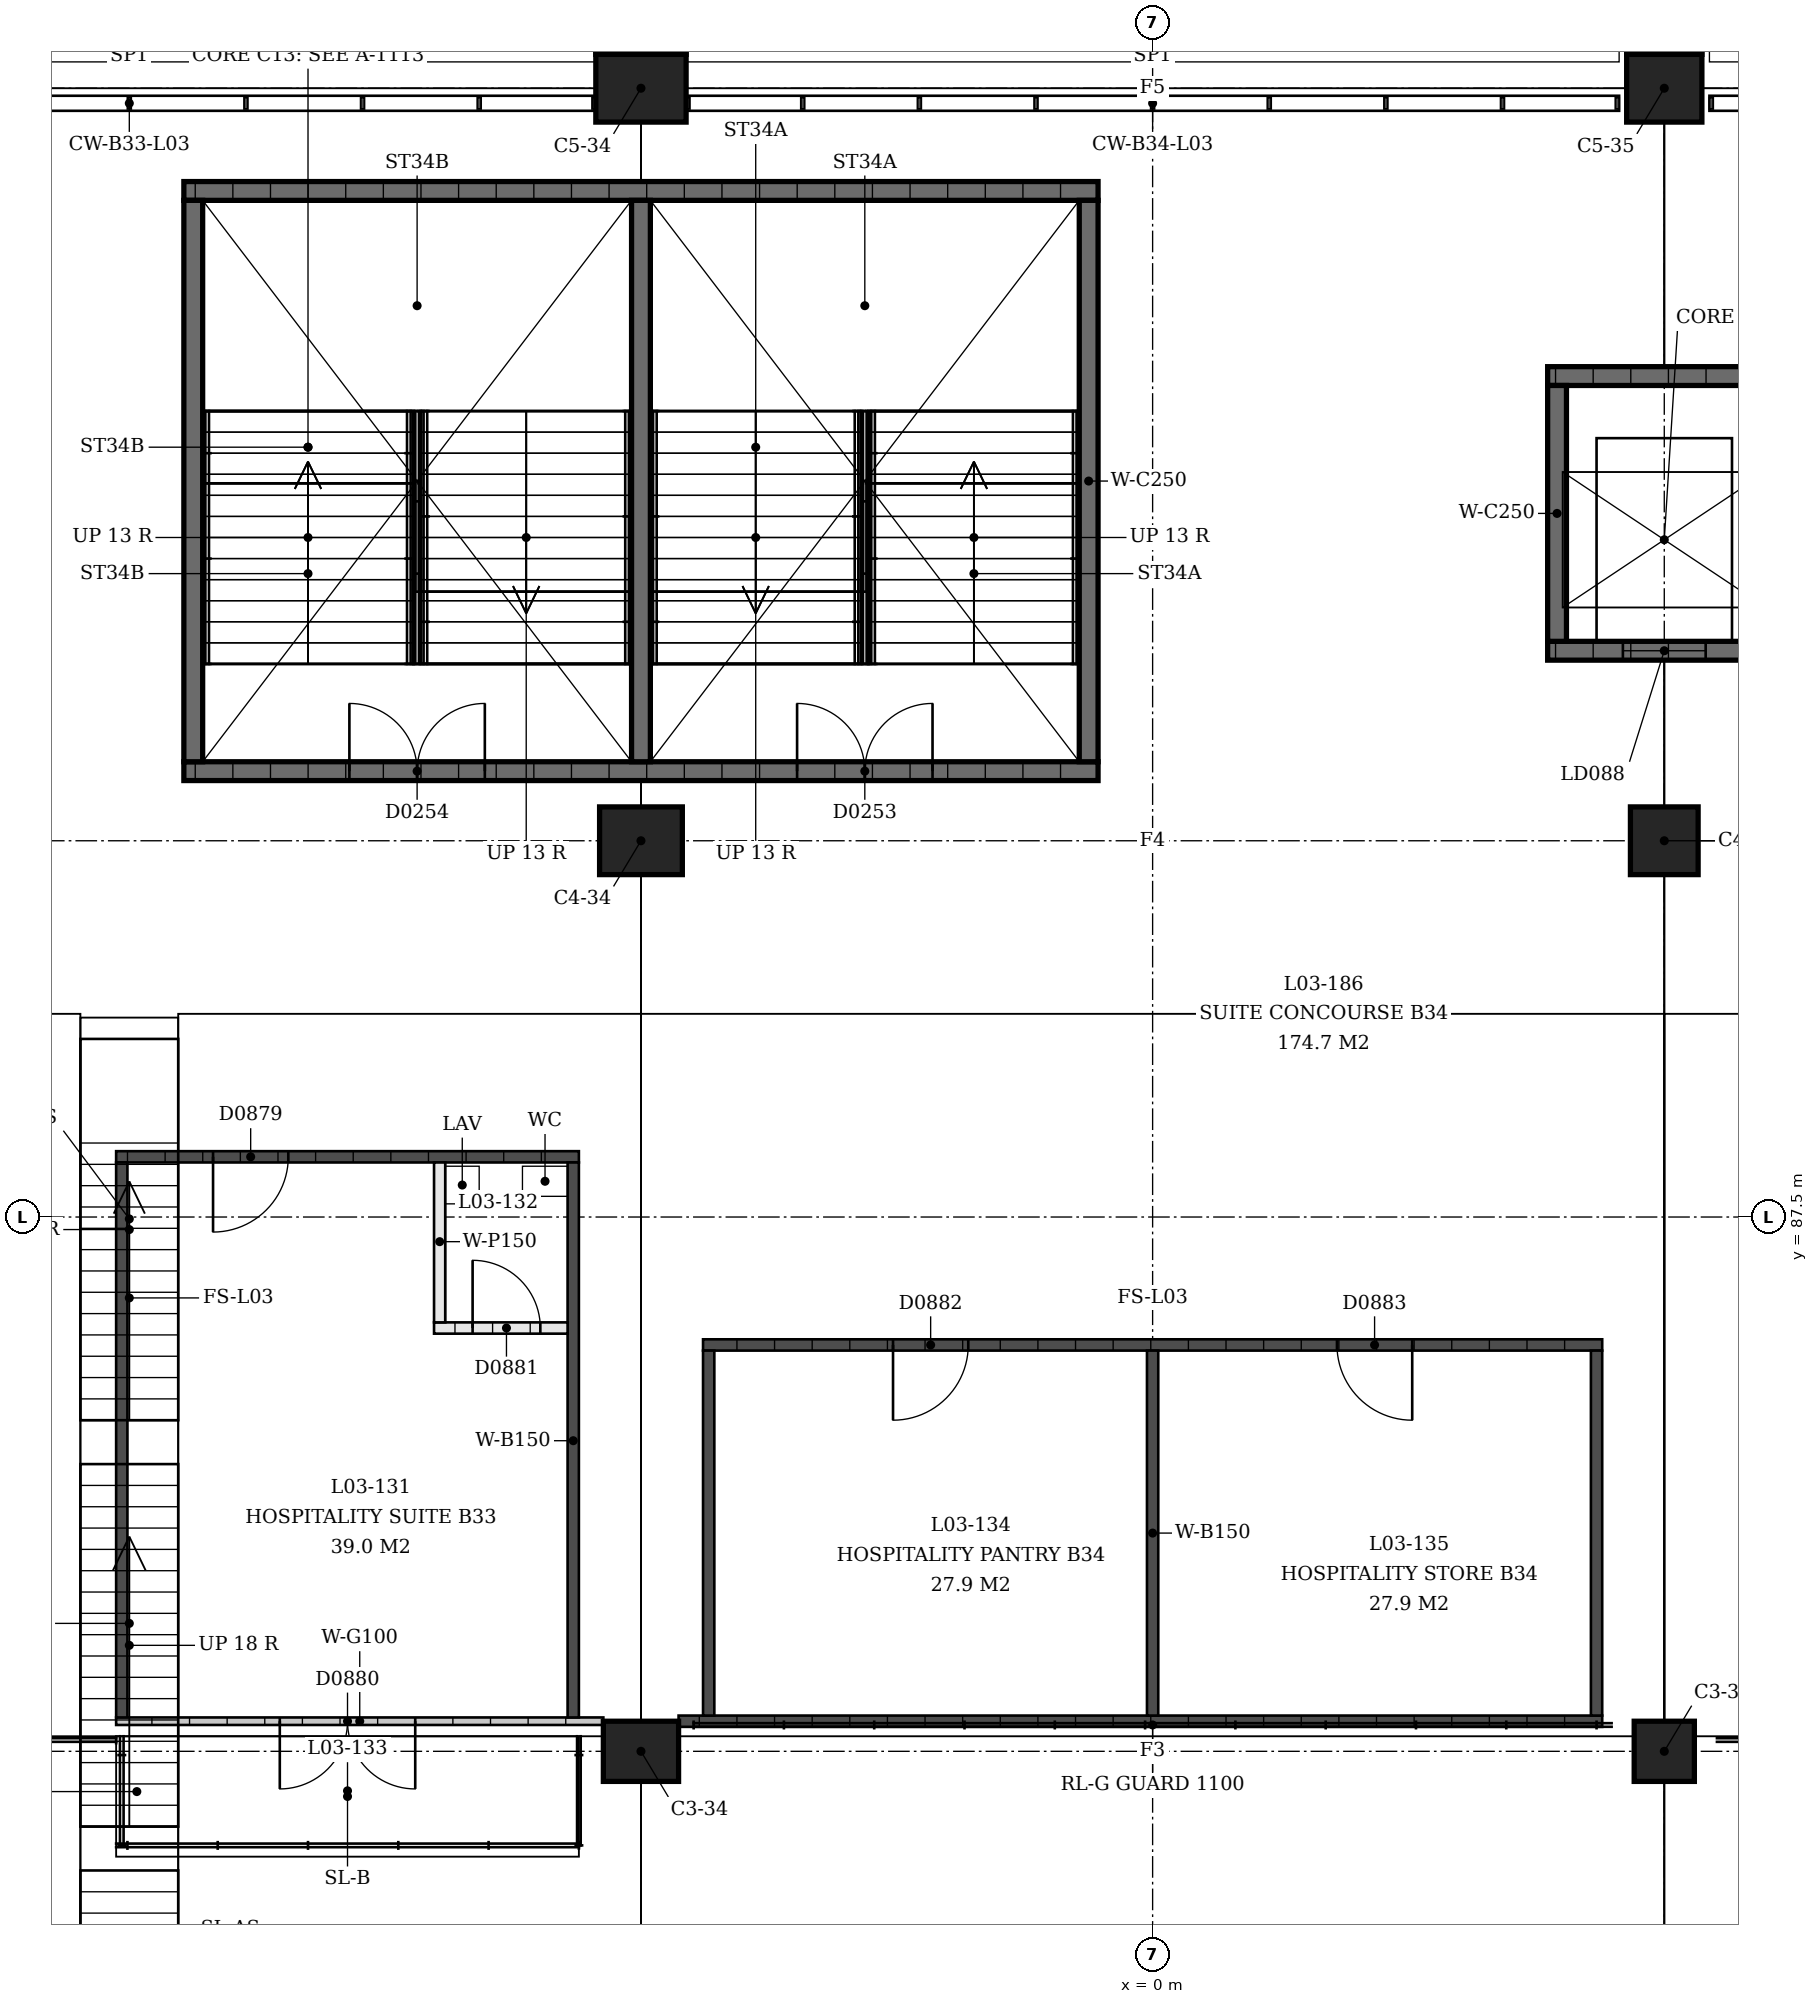
"""IFC4 building model, lengths in metres.
Left out: names, types, materials, properties, quantities, classifications, styles, units other than length and angle.
Written with IfcOpenShell. Run it as: python <this file> out.ifc"""

import sys

from ifc_helpers import new_model, si_unit, direction, frame, frame_2d, origin, origin_2d, place, context, subcontext, project, spatial, rectangle, extrude, element, fill, save


model = new_model("IFC4")
c1 = context("Model", 3, precision=1e-05, world=origin(), true_north=direction((0.0, 1.0)))
c2 = subcontext(c1, "Body", "Model", "MODEL_VIEW")
j1 = project(units=[si_unit("LENGTHUNIT", "METRE"), si_unit("PLANEANGLEUNIT", "RADIAN")], contexts=[c1])
p1 = place(None, origin())
s1 = spatial("IfcSite", under=j1, at=p1, CompositionType="ELEMENT")
p2 = place(p1, origin())
s2 = spatial("IfcBuilding", under=s1, at=p2, CompositionType="ELEMENT")
p3 = place(p2, frame((0.0, 0.0, 13.5)))
s3 = spatial("IfcBuildingStorey", under=s2, at=p3, CompositionType="ELEMENT", Elevation=13.5)
p4 = place(p3, frame((-6.8, 80.4, 0.0), z_axis=(0.0, 0.0, 1.0), x_axis=(-1.0, 0.0, 0.0)))
e1 = element("IfcColumn", 1, at=p4, inside=s3, PredefinedType="COLUMN", context=c2, shape_type="SweptSolid", body=[
    extrude(rectangle(XDim=1.0, YDim=0.8, at=origin_2d()), origin(), (0.0, 0.0, 1.0), 2.033),
])
p5 = place(p3, frame((-6.8, 92.5, 0.0), z_axis=(0.0, 0.0, 1.0), x_axis=(-1.0, 0.0, 0.0)))
e2 = element("IfcColumn", 2, at=p5, inside=s3, PredefinedType="COLUMN", context=c2, shape_type="SweptSolid", body=[
    extrude(rectangle(XDim=1.1, YDim=0.9, at=origin_2d()), origin(), (0.0, 0.0, 1.0), 4.5),
])
p6 = place(p3, frame((-6.8, 102.5, 0.0), z_axis=(0.0, 0.0, 1.0), x_axis=(-1.0, 0.0, 0.0)))
e3 = element("IfcColumn", 3, at=p6, inside=s3, PredefinedType="COLUMN", context=c2, shape_type="SweptSolid", body=[
    extrude(rectangle(XDim=1.2, YDim=0.9, at=origin_2d()), origin(), (0.0, 0.0, 1.0), 4.5),
])
p7 = place(p3, frame((6.8, 80.4, 0.0), z_axis=(0.0, 0.0, 1.0), x_axis=(-1.0, 0.0, 0.0)))
e4 = element("IfcColumn", 4, at=p7, inside=s3, PredefinedType="COLUMN", context=c2, shape_type="SweptSolid", body=[
    extrude(rectangle(XDim=0.8, YDim=0.8, at=origin_2d()), origin(), (0.0, 0.0, 1.0), 2.033),
])
p8 = place(p3, frame((6.8, 92.5, 0.0), z_axis=(0.0, 0.0, 1.0), x_axis=(-1.0, 0.0, 0.0)))
e5 = element("IfcColumn", 5, at=p8, inside=s3, PredefinedType="COLUMN", context=c2, shape_type="SweptSolid", body=[
    extrude(rectangle(XDim=0.9, YDim=0.9, at=origin_2d()), origin(), (0.0, 0.0, 1.0), 4.5),
])
p9 = place(p3, frame((6.8, 102.5, 0.0), z_axis=(0.0, 0.0, 1.0), x_axis=(-1.0, 0.0, 0.0)))
e6 = element("IfcColumn", 6, at=p9, inside=s3, PredefinedType="COLUMN", context=c2, shape_type="SweptSolid", body=[
    extrude(rectangle(XDim=1.0, YDim=0.9, at=origin_2d()), origin(), (0.0, 0.0, 1.0), 4.5),
])
p10 = place(p3, frame((-0.725, 93.425, 0.0), z_axis=(0.0, 0.0, 1.0), x_axis=(-1.0, 0.0, 0.0)))
e7 = element("IfcWall", 7, at=p10, inside=s3, PredefinedType="SHEAR", context=c2, shape_type="SweptSolid", body=[
    extrude(rectangle(XDim=12.15, YDim=0.25, at=frame_2d((6.075, 0.0))), origin(), (0.0, 0.0, 1.0), 4.09),
])
p11 = place(p10, frame((2.2, 0.0, 0.0)))
e8 = element("IfcOpeningElement", 8, at=p11, cuts=e7, PredefinedType="OPENING", context=c2, shape_type="SweptSolid", body=[
    extrude(rectangle(XDim=1.8, YDim=2.1, at=frame_2d((0.9, 1.05))), frame((0.0, 0.125, 0.0), z_axis=(0.0, -1.0, 0.0), x_axis=(1.0, 0.0, 0.0)), (0.0, 0.0, 1.0), 0.25),
])
p12 = place(p10, frame((8.15, 0.0, 0.0)))
e9 = element("IfcOpeningElement", 9, at=p12, cuts=e7, PredefinedType="OPENING", context=c2, shape_type="SweptSolid", body=[
    extrude(rectangle(XDim=1.8, YDim=2.1, at=frame_2d((0.9, 1.05))), frame((0.0, 0.125, 0.0), z_axis=(0.0, -1.0, 0.0), x_axis=(1.0, 0.0, 0.0)), (0.0, 0.0, 1.0), 0.25),
])
p13 = place(p3, frame((-0.725, 101.135, 0.0), z_axis=(0.0, 0.0, 1.0), x_axis=(-1.0, 0.0, 0.0)))
e10 = element("IfcWall", 10, at=p13, inside=s3, PredefinedType="SHEAR", context=c2, shape_type="SweptSolid", body=[
    extrude(rectangle(XDim=12.15, YDim=0.25, at=frame_2d((6.075, 0.0))), origin(), (0.0, 0.0, 1.0), 4.09),
])
for number, where, z_axis, x_axis in (
    (11, (-0.85, 93.55, 0.0), (0.0, 0.0, 1.0), (0.0, 1.0, 0.0)),
    (12, (-12.75, 93.55, 0.0), (0.0, 0.0, 1.0), (0.0, 1.0, 0.0)),
    (13, (-6.8, 93.55, 0.0), (0.0, 0.0, 1.0), (0.0, 1.0, 0.0)),
):
    element("IfcWall", number, at=place(p3, frame(where, z_axis=z_axis, x_axis=x_axis)), inside=s3, PredefinedType="SHEAR", context=c2, shape_type="SweptSolid", body=[
        extrude(rectangle(XDim=7.46, YDim=0.25, at=frame_2d((3.73, 0.0))), origin(), (0.0, 0.0, 1.0), 4.09),
    ])
p14 = place(p3, frame((8.35, 95.025, 0.0), z_axis=(0.0, 0.0, 1.0), x_axis=(-1.0, 0.0, 0.0)))
e14 = element("IfcWall", 14, at=p14, inside=s3, PredefinedType="SHEAR", context=c2, shape_type="SweptSolid", body=[
    extrude(rectangle(XDim=3.1, YDim=0.25, at=frame_2d((1.55, 0.0))), origin(), (0.0, 0.0, 1.0), 4.09),
])
p15 = place(p14, frame((1.0, 0.0, 0.0)))
e15 = element("IfcOpeningElement", 15, at=p15, cuts=e14, PredefinedType="OPENING", context=c2, shape_type="SweptSolid", body=[
    extrude(rectangle(XDim=1.1, YDim=2.1, at=frame_2d((0.55, 1.05))), frame((0.0, 0.125, 0.0), z_axis=(0.0, -1.0, 0.0), x_axis=(1.0, 0.0, 0.0)), (0.0, 0.0, 1.0), 0.25),
])
p16 = place(p3, frame((8.35, 98.675, 0.0), z_axis=(0.0, 0.0, 1.0), x_axis=(-1.0, 0.0, 0.0)))
e16 = element("IfcWall", 16, at=p16, inside=s3, PredefinedType="SHEAR", context=c2, shape_type="SweptSolid", body=[
    extrude(rectangle(XDim=3.1, YDim=0.25, at=frame_2d((1.55, 0.0))), origin(), (0.0, 0.0, 1.0), 4.09),
])
p17 = place(p3, frame((5.375, 95.15, 0.0), z_axis=(0.0, 0.0, 1.0), x_axis=(0.0, 1.0, 0.0)))
e17 = element("IfcWall", 17, at=p17, inside=s3, PredefinedType="SHEAR", context=c2, shape_type="SweptSolid", body=[
    extrude(rectangle(XDim=3.4, YDim=0.25, at=frame_2d((1.7, 0.0))), origin(), (0.0, 0.0, 1.0), 4.09),
])
p18 = place(p3, frame((-7.3, 80.8, 0.0), z_axis=(0.0, 0.0, 1.0), x_axis=(-1.0, 0.0, 0.0)))
e18 = element("IfcWall", 18, at=p18, inside=s3, PredefinedType="PARTITIONING", context=c2, shape_type="SweptSolid", body=[
    extrude(rectangle(XDim=6.475, YDim=0.1, at=frame_2d((3.237, 0.0))), origin(), (0.0, 0.0, 1.0), 3.0),
])
p19 = place(p18, frame((2.5, 0.0, 0.0)))
e19 = element("IfcOpeningElement", 19, at=p19, cuts=e18, PredefinedType="OPENING", context=c2, shape_type="SweptSolid", body=[
    extrude(rectangle(XDim=1.8, YDim=2.1, at=frame_2d((0.9, 1.05))), frame((0.0, 0.05, 0.0), z_axis=(0.0, -1.0, 0.0), x_axis=(1.0, 0.0, 0.0)), (0.0, 0.0, 1.0), 0.1),
])
p20 = place(p3, frame((-7.625, 88.3, 0.0), z_axis=(0.0, 0.0, 1.0), x_axis=(-1.0, 0.0, 0.0)))
e20 = element("IfcWall", 20, at=p20, inside=s3, PredefinedType="SOLIDWALL", context=c2, shape_type="SweptSolid", body=[
    extrude(rectangle(XDim=6.15, YDim=0.15, at=frame_2d((3.075, 0.0))), origin(), (0.0, 0.0, 1.0), 3.0),
])
p21 = place(p20, frame((3.862, 0.0, 0.0)))
e21 = element("IfcOpeningElement", 21, at=p21, cuts=e20, PredefinedType="OPENING", context=c2, shape_type="SweptSolid", body=[
    extrude(rectangle(XDim=1.0, YDim=2.1, at=frame_2d((0.5, 1.05))), frame((0.0, 0.075, 0.0), z_axis=(0.0, -1.0, 0.0), x_axis=(1.0, 0.0, 0.0)), (0.0, 0.0, 1.0), 0.15),
])
for number, where, z_axis, x_axis in (
    (22, (-7.7, 80.85, 0.0), (0.0, 0.0, 1.0), (0.0, 1.0, 0.0)),
    (23, (-13.7, 80.85, 0.0), (0.0, 0.0, 1.0), (0.0, 1.0, 0.0)),
):
    element("IfcWall", number, at=place(p3, frame(where, z_axis=z_axis, x_axis=x_axis)), inside=s3, PredefinedType="SOLIDWALL", context=c2, shape_type="SweptSolid", body=[
        extrude(rectangle(XDim=7.375, YDim=0.15, at=frame_2d((3.688, 0.0))), origin(), (0.0, 0.0, 1.0), 3.0),
    ])
p22 = place(p3, frame((-7.775, 86.025, 0.0), z_axis=(0.0, 0.0, 1.0), x_axis=(-1.0, 0.0, 0.0)))
e24 = element("IfcWall", 24, at=p22, inside=s3, PredefinedType="PARTITIONING", context=c2, shape_type="SweptSolid", body=[
    extrude(rectangle(XDim=1.775, YDim=0.15, at=frame_2d((0.888, 0.0))), origin(), (0.0, 0.0, 1.0), 3.0),
])
p23 = place(p22, frame((0.363, 0.0, 0.0)))
e25 = element("IfcOpeningElement", 25, at=p23, cuts=e24, PredefinedType="OPENING", context=c2, shape_type="SweptSolid", body=[
    extrude(rectangle(XDim=0.9, YDim=2.1, at=frame_2d((0.45, 1.05))), frame((0.0, 0.075, 0.0), z_axis=(0.0, -1.0, 0.0), x_axis=(1.0, 0.0, 0.0)), (0.0, 0.0, 1.0), 0.15),
])
p24 = place(p3, frame((-9.475, 86.1, 0.0), z_axis=(0.0, 0.0, 1.0), x_axis=(0.0, 1.0, 0.0)))
e26 = element("IfcWall", 26, at=p24, inside=s3, PredefinedType="PARTITIONING", context=c2, shape_type="SweptSolid", body=[
    extrude(rectangle(XDim=2.125, YDim=0.15, at=frame_2d((1.062, 0.0))), origin(), (0.0, 0.0, 1.0), 3.0),
])
p25 = place(p3, frame((-6.3, 80.8, 0.0), z_axis=(0.0, 0.0, 1.0), x_axis=(1.0, 0.0, 0.0)))
e27 = element("IfcWall", 27, at=p25, inside=s3, PredefinedType="SOLIDWALL", context=c2, shape_type="SweptSolid", body=[
    extrude(rectangle(XDim=12.275, YDim=0.15, at=frame_2d((6.138, 0.0))), origin(), (0.0, 0.0, 1.0), 3.0),
])
p26 = place(p3, frame((-5.975, 85.8, 0.0), z_axis=(0.0, 0.0, 1.0), x_axis=(1.0, 0.0, 0.0)))
e28 = element("IfcWall", 28, at=p26, inside=s3, PredefinedType="SOLIDWALL", context=c2, shape_type="SweptSolid", body=[
    extrude(rectangle(XDim=11.95, YDim=0.15, at=frame_2d((5.975, 0.0))), origin(), (0.0, 0.0, 1.0), 3.0),
])
p27 = place(p26, frame((2.525, 0.0, 0.0)))
e29 = element("IfcOpeningElement", 29, at=p27, cuts=e28, PredefinedType="OPENING", context=c2, shape_type="SweptSolid", body=[
    extrude(rectangle(XDim=1.0, YDim=2.1, at=frame_2d((0.5, 1.05))), frame((0.0, 0.075, 0.0), z_axis=(0.0, -1.0, 0.0), x_axis=(1.0, 0.0, 0.0)), (0.0, 0.0, 1.0), 0.15),
])
p28 = place(p26, frame((8.425, 0.0, 0.0)))
e30 = element("IfcOpeningElement", 30, at=p28, cuts=e28, PredefinedType="OPENING", context=c2, shape_type="SweptSolid", body=[
    extrude(rectangle(XDim=1.0, YDim=2.1, at=frame_2d((0.5, 1.05))), frame((0.0, 0.075, 0.0), z_axis=(0.0, -1.0, 0.0), x_axis=(1.0, 0.0, 0.0)), (0.0, 0.0, 1.0), 0.15),
])
for number, where, z_axis, x_axis in (
    (31, (-5.9, 80.875, 0.0), (0.0, 0.0, 1.0), (0.0, 1.0, 0.0)),
    (32, (0.0, 80.875, 0.0), (0.0, 0.0, 1.0), (0.0, 1.0, 0.0)),
    (33, (5.9, 80.875, 0.0), (0.0, 0.0, 1.0), (0.0, 1.0, 0.0)),
):
    element("IfcWall", number, at=place(p3, frame(where, z_axis=z_axis, x_axis=x_axis)), inside=s3, PredefinedType="SOLIDWALL", context=c2, shape_type="SweptSolid", body=[
        extrude(rectangle(XDim=4.85, YDim=0.15, at=frame_2d((2.425, 0.0))), origin(), (0.0, 0.0, 1.0), 3.0),
    ])
p29 = place(p11, origin())
e34 = element("IfcDoor", 34, at=p29, inside=s3, OperationType="DOUBLE_DOOR_SINGLE_SWING", PredefinedType="DOOR", context=c2, shape_type="SweptSolid", body=[
    extrude(rectangle(XDim=1.8, YDim=2.1, at=frame_2d((0.9, 1.05))), frame((0.0, 0.025, 0.0), z_axis=(0.0, -1.0, 0.0), x_axis=(1.0, 0.0, 0.0)), (0.0, 0.0, 1.0), 0.05),
])
fill(e8, e34)
p30 = place(p12, origin())
e35 = element("IfcDoor", 35, at=p30, inside=s3, OperationType="DOUBLE_DOOR_SINGLE_SWING", PredefinedType="DOOR", context=c2, shape_type="SweptSolid", body=[
    extrude(rectangle(XDim=1.8, YDim=2.1, at=frame_2d((0.9, 1.05))), frame((0.0, 0.025, 0.0), z_axis=(0.0, -1.0, 0.0), x_axis=(1.0, 0.0, 0.0)), (0.0, 0.0, 1.0), 0.05),
])
fill(e9, e35)
p31 = place(p15, origin())
e36 = element("IfcDoor", 36, at=p31, inside=s3, OperationType="SLIDING_TO_LEFT", PredefinedType="DOOR", context=c2, shape_type="SweptSolid", body=[
    extrude(rectangle(XDim=1.1, YDim=2.1, at=frame_2d((0.55, 1.05))), frame((0.0, 0.025, 0.0), z_axis=(0.0, -1.0, 0.0), x_axis=(1.0, 0.0, 0.0)), (0.0, 0.0, 1.0), 0.05),
])
fill(e15, e36)
p32 = place(p21, origin())
e37 = element("IfcDoor", 37, at=p32, inside=s3, OperationType="SINGLE_SWING_LEFT", PredefinedType="DOOR", context=c2, shape_type="SweptSolid", body=[
    extrude(rectangle(XDim=1.0, YDim=2.1, at=frame_2d((0.5, 1.05))), frame((0.0, 0.025, 0.0), z_axis=(0.0, -1.0, 0.0), x_axis=(1.0, 0.0, 0.0)), (0.0, 0.0, 1.0), 0.05),
])
fill(e21, e37)
p33 = place(p19, origin())
e38 = element("IfcDoor", 38, at=p33, inside=s3, OperationType="DOUBLE_DOOR_SINGLE_SWING", PredefinedType="DOOR", context=c2, shape_type="SweptSolid", body=[
    extrude(rectangle(XDim=1.8, YDim=2.1, at=frame_2d((0.9, 1.05))), frame((0.0, 0.025, 0.0), z_axis=(0.0, -1.0, 0.0), x_axis=(1.0, 0.0, 0.0)), (0.0, 0.0, 1.0), 0.05),
])
fill(e19, e38)
p34 = place(p23, origin())
e39 = element("IfcDoor", 39, at=p34, inside=s3, OperationType="SINGLE_SWING_RIGHT", PredefinedType="DOOR", context=c2, shape_type="SweptSolid", body=[
    extrude(rectangle(XDim=0.9, YDim=2.1, at=frame_2d((0.45, 1.05))), frame((0.0, 0.025, 0.0), z_axis=(0.0, -1.0, 0.0), x_axis=(1.0, 0.0, 0.0)), (0.0, 0.0, 1.0), 0.05),
])
fill(e25, e39)
p35 = place(p27, origin())
e40 = element("IfcDoor", 40, at=p35, inside=s3, OperationType="SINGLE_SWING_LEFT", PredefinedType="DOOR", context=c2, shape_type="SweptSolid", body=[
    extrude(rectangle(XDim=1.0, YDim=2.1, at=frame_2d((0.5, 1.05))), frame((0.0, 0.025, 0.0), z_axis=(0.0, -1.0, 0.0), x_axis=(1.0, 0.0, 0.0)), (0.0, 0.0, 1.0), 0.05),
])
fill(e29, e40)
p36 = place(p28, origin())
e41 = element("IfcDoor", 41, at=p36, inside=s3, OperationType="SINGLE_SWING_RIGHT", PredefinedType="DOOR", context=c2, shape_type="SweptSolid", body=[
    extrude(rectangle(XDim=1.0, YDim=2.1, at=frame_2d((0.5, 1.05))), frame((0.0, 0.025, 0.0), z_axis=(0.0, -1.0, 0.0), x_axis=(1.0, 0.0, 0.0)), (0.0, 0.0, 1.0), 0.05),
])
fill(e30, e41)
save(model, sys.argv[1])
